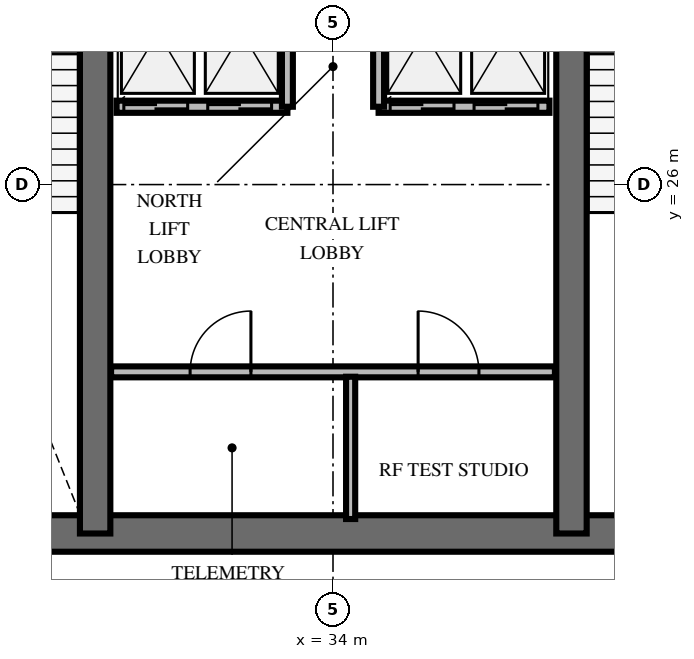
"""IFC4 building model, lengths in metres.
Left out: names, types, materials, properties, quantities, classifications, styles, units other than length and angle.
Written with IfcOpenShell. Run it as: python <this file> out.ifc"""

import sys

from ifc_helpers import new_model, si_unit, direction, frame, frame_2d, origin, place, context, subcontext, project, spatial, rectangle, extrude, element, fill, save


model = new_model("IFC4")
c1 = context("Model", 3, precision=1e-05, world=origin(), true_north=direction((0.0, 1.0)))
c2 = subcontext(c1, "Body", "Model", "MODEL_VIEW")
j1 = project(units=[si_unit("LENGTHUNIT", "METRE"), si_unit("PLANEANGLEUNIT", "RADIAN")], contexts=[c1])
p1 = place(None, origin())
s1 = spatial("IfcSite", under=j1, at=p1, CompositionType="ELEMENT")
p2 = place(p1, origin())
s2 = spatial("IfcBuilding", under=s1, at=p2, CompositionType="ELEMENT")
p3 = place(p2, frame((0.0, 0.0, 284.4)))
s3 = spatial("IfcBuildingStorey", under=s2, at=p3, CompositionType="ELEMENT", Elevation=284.4)
p4 = place(p3, frame((26.222, 20.262, 0.0), z_axis=(0.0, 0.0, 1.0), x_axis=(1.0, 0.0, 0.0)))
e1 = element("IfcWall", 1, at=p4, inside=s3, PredefinedType="SHEAR", context=c2, shape_type="SweptSolid", body=[
    extrude(rectangle(XDim=15.566, YDim=0.6, at=frame_2d((7.783, 0.0))), origin(), (0.0, 0.0, 1.0), 3.6),
])
for number, where, z_axis, x_axis in (
    (2, (30.088, 20.262, 0.0), (0.0, 0.0, 1.0), (0.0, 1.0, 0.0)),
    (3, (37.922, 20.262, 0.0), (0.0, 0.0, 1.0), (0.0, 1.0, 0.0)),
):
    element("IfcWall", number, at=place(p3, frame(where, z_axis=z_axis, x_axis=x_axis)), inside=s3, PredefinedType="SHEAR", context=c2, shape_type="SweptSolid", body=[
        extrude(rectangle(XDim=9.676, YDim=0.5, at=frame_2d((4.838, 0.0))), origin(), (0.0, 0.0, 1.0), 3.6),
    ])
p5 = place(p3, frame((30.35, 22.92, 0.0), z_axis=(0.0, 0.0, 1.0), x_axis=(1.0, 0.0, 0.0)))
e4 = element("IfcWall", 4, at=p5, inside=s3, PredefinedType="PARTITIONING", context=c2, shape_type="SweptSolid", body=[
    extrude(rectangle(XDim=7.3, YDim=0.18, at=frame_2d((3.65, 0.0))), origin(), (0.0, 0.0, 1.0), 2.12),
])
p6 = place(p5, frame((1.3, 0.0, 0.0)))
e5 = element("IfcOpeningElement", 5, at=p6, cuts=e4, PredefinedType="OPENING", context=c2, shape_type="SweptSolid", body=[
    extrude(rectangle(XDim=1.0, YDim=2.15, at=frame_2d((0.5, 1.075))), frame((0.0, 0.1, 0.0), z_axis=(0.0, -1.0, 0.0), x_axis=(1.0, 0.0, 0.0)), (0.0, 0.0, 1.0), 0.2),
])
p7 = place(p5, frame((5.05, 0.0, 0.0)))
e6 = element("IfcOpeningElement", 6, at=p7, cuts=e4, PredefinedType="OPENING", context=c2, shape_type="SweptSolid", body=[
    extrude(rectangle(XDim=1.0, YDim=2.15, at=frame_2d((0.5, 1.075))), frame((0.0, 0.1, 0.0), z_axis=(0.0, -1.0, 0.0), x_axis=(1.0, 0.0, 0.0)), (0.0, 0.0, 1.0), 0.2),
])
p8 = place(p3, frame((34.29, 20.5, 0.0), z_axis=(0.0, 0.0, 1.0), x_axis=(0.0, 1.0, 0.0)))
e7 = element("IfcWall", 7, at=p8, inside=s3, PredefinedType="PARTITIONING", context=c2, shape_type="SweptSolid", body=[
    extrude(rectangle(XDim=2.34, YDim=0.15, at=frame_2d((1.17, 0.0))), origin(), (0.0, 0.0, 1.0), 2.12),
])
p9 = place(p3, frame((30.44, 27.28, 0.0), z_axis=(0.0, 0.0, 1.0), x_axis=(1.0, 0.0, 0.0)))
e8 = element("IfcWall", 8, at=p9, inside=s3, PredefinedType="SOLIDWALL", context=c2, shape_type="SweptSolid", body=[
    extrude(rectangle(XDim=2.81, YDim=0.2, at=frame_2d((1.405, 0.0))), origin(), (0.0, 0.0, 1.0), 2.1),
])
p10 = place(p9, frame((0.12, 0.0, 0.0)))
e9 = element("IfcOpeningElement", 9, at=p10, cuts=e8, PredefinedType="OPENING", context=c2, shape_type="SweptSolid", body=[
    extrude(rectangle(XDim=1.05, YDim=2.1, at=frame_2d((0.525, 1.05))), frame((0.0, 0.11, 0.0), z_axis=(0.0, -1.0, 0.0), x_axis=(1.0, 0.0, 0.0)), (0.0, 0.0, 1.0), 0.22),
])
p11 = place(p9, frame((1.5, 0.0, 0.0)))
e10 = element("IfcOpeningElement", 10, at=p11, cuts=e8, PredefinedType="OPENING", context=c2, shape_type="SweptSolid", body=[
    extrude(rectangle(XDim=1.05, YDim=2.1, at=frame_2d((0.525, 1.05))), frame((0.0, 0.11, 0.0), z_axis=(0.0, -1.0, 0.0), x_axis=(1.0, 0.0, 0.0)), (0.0, 0.0, 1.0), 0.22),
])
p12 = place(p3, frame((33.25, 27.28, 0.0), z_axis=(0.0, 0.0, 1.0), x_axis=(0.0, 1.0, 0.0)))
e11 = element("IfcWall", 11, at=p12, inside=s3, PredefinedType="SOLIDWALL", context=c2, shape_type="SweptSolid", body=[
    extrude(rectangle(XDim=2.47, YDim=0.18, at=frame_2d((1.235, 0.0))), origin(), (0.0, 0.0, 1.0), 2.12),
])
p13 = place(p3, frame((34.75, 27.28, 0.0), z_axis=(0.0, 0.0, 1.0), x_axis=(1.0, 0.0, 0.0)))
e12 = element("IfcWall", 12, at=p13, inside=s3, PredefinedType="SOLIDWALL", context=c2, shape_type="SweptSolid", body=[
    extrude(rectangle(XDim=2.81, YDim=0.2, at=frame_2d((1.405, 0.0))), origin(), (0.0, 0.0, 1.0), 2.1),
])
p14 = place(p13, frame((0.19, 0.0, 0.0)))
e13 = element("IfcOpeningElement", 13, at=p14, cuts=e12, PredefinedType="OPENING", context=c2, shape_type="SweptSolid", body=[
    extrude(rectangle(XDim=1.05, YDim=2.1, at=frame_2d((0.525, 1.05))), frame((0.0, 0.11, 0.0), z_axis=(0.0, -1.0, 0.0), x_axis=(1.0, 0.0, 0.0)), (0.0, 0.0, 1.0), 0.22),
])
p15 = place(p13, frame((1.57, 0.0, 0.0)))
e14 = element("IfcOpeningElement", 14, at=p15, cuts=e12, PredefinedType="OPENING", context=c2, shape_type="SweptSolid", body=[
    extrude(rectangle(XDim=1.05, YDim=2.1, at=frame_2d((0.525, 1.05))), frame((0.0, 0.11, 0.0), z_axis=(0.0, -1.0, 0.0), x_axis=(1.0, 0.0, 0.0)), (0.0, 0.0, 1.0), 0.22),
])
p16 = place(p3, frame((34.75, 27.28, 0.0), z_axis=(0.0, 0.0, 1.0), x_axis=(0.0, 1.0, 0.0)))
e15 = element("IfcWall", 15, at=p16, inside=s3, PredefinedType="SOLIDWALL", context=c2, shape_type="SweptSolid", body=[
    extrude(rectangle(XDim=2.47, YDim=0.18, at=frame_2d((1.235, 0.0))), origin(), (0.0, 0.0, 1.0), 2.12),
])
p17 = place(p6, origin())
e16 = element("IfcDoor", 16, at=p17, inside=s3, OperationType="SINGLE_SWING_RIGHT", PredefinedType="DOOR", context=c2, shape_type="SweptSolid", body=[
    extrude(rectangle(XDim=1.0, YDim=2.15, at=frame_2d((0.5, 1.075))), frame((0.0, 0.025, 0.0), z_axis=(0.0, -1.0, 0.0), x_axis=(1.0, 0.0, 0.0)), (0.0, 0.0, 1.0), 0.05),
])
fill(e5, e16)
p18 = place(p7, origin())
e17 = element("IfcDoor", 17, at=p18, inside=s3, OperationType="SINGLE_SWING_LEFT", PredefinedType="DOOR", context=c2, shape_type="SweptSolid", body=[
    extrude(rectangle(XDim=1.0, YDim=2.15, at=frame_2d((0.5, 1.075))), frame((0.0, 0.025, 0.0), z_axis=(0.0, -1.0, 0.0), x_axis=(1.0, 0.0, 0.0)), (0.0, 0.0, 1.0), 0.05),
])
fill(e6, e17)
p19 = place(p10, origin())
e18 = element("IfcDoor", 18, at=p19, inside=s3, OperationType="DOUBLE_DOOR_SLIDING", PredefinedType="USERDEFINED", context=c2, shape_type="SweptSolid", body=[
    extrude(rectangle(XDim=1.05, YDim=2.1, at=frame_2d((0.525, 1.05))), frame((0.0, 0.025, 0.0), z_axis=(0.0, -1.0, 0.0), x_axis=(1.0, 0.0, 0.0)), (0.0, 0.0, 1.0), 0.05),
])
fill(e9, e18)
p20 = place(p11, origin())
e19 = element("IfcDoor", 19, at=p20, inside=s3, OperationType="DOUBLE_DOOR_SLIDING", PredefinedType="USERDEFINED", context=c2, shape_type="SweptSolid", body=[
    extrude(rectangle(XDim=1.05, YDim=2.1, at=frame_2d((0.525, 1.05))), frame((0.0, 0.025, 0.0), z_axis=(0.0, -1.0, 0.0), x_axis=(1.0, 0.0, 0.0)), (0.0, 0.0, 1.0), 0.05),
])
fill(e10, e19)
p21 = place(p14, origin())
e20 = element("IfcDoor", 20, at=p21, inside=s3, OperationType="DOUBLE_DOOR_SLIDING", PredefinedType="USERDEFINED", context=c2, shape_type="SweptSolid", body=[
    extrude(rectangle(XDim=1.05, YDim=2.1, at=frame_2d((0.525, 1.05))), frame((0.0, 0.025, 0.0), z_axis=(0.0, -1.0, 0.0), x_axis=(1.0, 0.0, 0.0)), (0.0, 0.0, 1.0), 0.05),
])
fill(e13, e20)
p22 = place(p15, origin())
e21 = element("IfcDoor", 21, at=p22, inside=s3, OperationType="DOUBLE_DOOR_SLIDING", PredefinedType="USERDEFINED", context=c2, shape_type="SweptSolid", body=[
    extrude(rectangle(XDim=1.05, YDim=2.1, at=frame_2d((0.525, 1.05))), frame((0.0, 0.025, 0.0), z_axis=(0.0, -1.0, 0.0), x_axis=(1.0, 0.0, 0.0)), (0.0, 0.0, 1.0), 0.05),
])
fill(e14, e21)
save(model, sys.argv[1])
